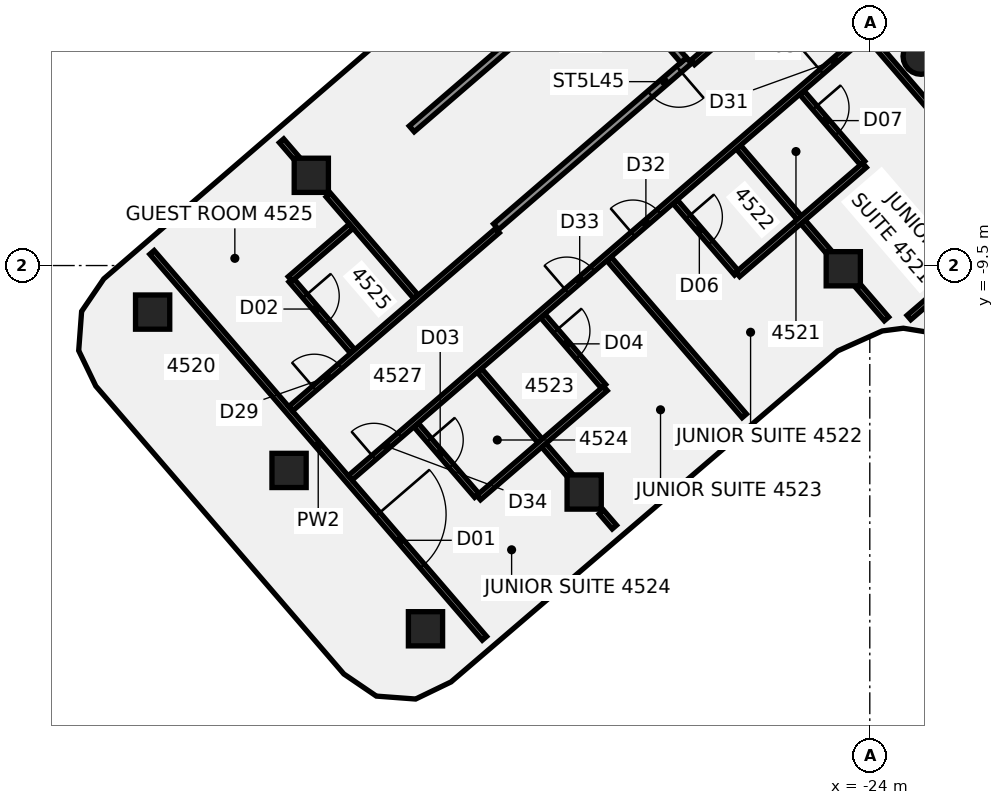
"""IFC4 building model, lengths in metres.
Left out: names, types, materials, properties, quantities, classifications, styles, units other than length and angle.
Written with IfcOpenShell. Run it as: python <this file> out.ifc"""

import sys

from ifc_helpers import new_model, si_unit, direction, frame, frame_2d, origin, origin_2d, place, context, subcontext, project, spatial, polyline, rectangle, circle, outline, extrude, element, fill, save


model = new_model("IFC4")
c1 = context("Model", 3, precision=1e-05, world=origin(), true_north=direction((0.0, 1.0)))
c2 = subcontext(c1, "Body", "Model", "MODEL_VIEW")
j1 = project(units=[si_unit("LENGTHUNIT", "METRE"), si_unit("PLANEANGLEUNIT", "RADIAN")], contexts=[c1])
p1 = place(None, origin())
s1 = spatial("IfcSite", under=j1, at=p1, CompositionType="ELEMENT")
p2 = place(p1, origin())
s2 = spatial("IfcBuilding", under=s1, at=p2, CompositionType="ELEMENT")
p3 = place(p2, frame((0.0, 0.0, 182.5)))
s3 = spatial("IfcBuildingStorey", under=s2, at=p3, CompositionType="ELEMENT", Elevation=182.5)
p4 = place(p3, frame((-22.651, -3.994, -0.14), z_axis=(0.0, 0.0, 1.0), x_axis=(1.0, 0.0, 0.0)))
e1 = element("IfcColumn", 1, at=p4, inside=s3, PredefinedType="COLUMN", context=c2, shape_type="SweptSolid", body=[
    extrude(circle(Radius=0.475, at=origin_2d()), origin(), (0.0, 0.0, 1.0), 3.6),
])
p5 = place(p3, frame((-31.516, -15.459, -0.133), z_axis=(0.07839124964, -0.047319070379, 0.995799034725), x_axis=(-0.649009542698, 0.755788776181, 0.087005398028)))
e2 = element("IfcColumn", 2, at=p5, inside=s3, PredefinedType="COLUMN", context=c2, shape_type="SweptSolid", body=[
    extrude(rectangle(XDim=0.9, YDim=0.9, at=origin_2d()), origin(), (0.0, 0.0, 1.0), 3.606),
])
p6 = place(p3, frame((-38.696, -7.126, -0.133), z_axis=(0.036686006843, -0.083863399406, 0.995801720797), x_axis=(0.758162598415, 0.651508924479, 0.026936883435)))
e3 = element("IfcColumn", 3, at=p6, inside=s3, PredefinedType="COLUMN", context=c2, shape_type="SweptSolid", body=[
    extrude(rectangle(XDim=0.9, YDim=0.9, at=origin_2d()), origin(), (0.0, 0.0, 1.0), 3.607),
])
p7 = place(p3, frame((-24.698, -9.584, -0.135), z_axis=(0.048576320124, -0.013229584391, 0.998731855515), x_axis=(-0.651247732409, 0.757717932984, 0.04171240903)))
e4 = element("IfcColumn", 4, at=p7, inside=s3, PredefinedType="COLUMN", context=c2, shape_type="SweptSolid", body=[
    extrude(rectangle(XDim=0.9, YDim=0.9, at=origin_2d()), origin(), (0.0, 0.0, 1.0), 3.599),
])
p8 = place(p3, frame((-42.871, -10.725, -0.125), z_axis=(0.10577694023, -0.05897537844, 0.992639483223), x_axis=(-0.6465033883, 0.75438904644, 0.113712512625)))
e5 = element("IfcColumn", 5, at=p8, inside=s3, PredefinedType="COLUMN", context=c2, shape_type="SweptSolid", body=[
    extrude(rectangle(XDim=0.9, YDim=0.9, at=origin_2d()), origin(), (0.0, 0.0, 1.0), 3.61),
])
p9 = place(p3, frame((-39.281, -14.891, -0.126), z_axis=(0.12637463351, -0.040639705862, 0.99114976987), x_axis=(-0.645550569996, 0.755269902041, 0.113277697048)))
e6 = element("IfcColumn", 6, at=p9, inside=s3, PredefinedType="COLUMN", context=c2, shape_type="SweptSolid", body=[
    extrude(rectangle(XDim=0.9, YDim=0.9, at=origin_2d()), origin(), (0.0, 0.0, 1.0), 3.616),
])
p10 = place(p3, frame((-35.691, -19.058, -0.128), z_axis=(0.146831669094, -0.022351267372, 0.988908935038), x_axis=(-0.644567349154, 0.756181261603, 0.112795531851)))
e7 = element("IfcColumn", 7, at=p10, inside=s3, PredefinedType="COLUMN", context=c2, shape_type="SweptSolid", body=[
    extrude(rectangle(XDim=0.9, YDim=0.9, at=origin_2d()), origin(), (0.0, 0.0, 1.0), 3.626),
])
p11 = place(p3, frame((-42.888, -9.154, 0.0), z_axis=(0.0, 0.0, 1.0), x_axis=(0.652715459728, -0.75760314719, 0.0)))
e8 = element("IfcWall", 8, at=p11, inside=s3, PredefinedType="PARTITIONING", context=c2, shape_type="SweptSolid", body=[
    extrude(rectangle(XDim=13.403, YDim=0.15, at=frame_2d((6.701, 0.0))), origin(), (0.0, 0.0, 1.0), 2.864),
])
p12 = place(p11, frame((9.099, 0.0, 0.0)))
e9 = element("IfcOpeningElement", 9, at=p12, cuts=e8, PredefinedType="OPENING", context=c2, shape_type="SweptSolid", body=[
    extrude(rectangle(XDim=1.8, YDim=2.1, at=frame_2d((0.9, 1.05))), frame((0.0, 0.085, 0.0), z_axis=(0.0, -1.0, 0.0), x_axis=(1.0, 0.0, 0.0)), (0.0, 0.0, 1.0), 0.17),
])
p13 = place(p3, frame((-39.479, -6.217, 0.0), z_axis=(0.0, 0.0, 1.0), x_axis=(0.652651234918, -0.757658475541, 0.0)))
e10 = element("IfcWall", 10, at=p13, inside=s3, PredefinedType="PARTITIONING", context=c2, shape_type="SweptSolid", body=[
    extrude(rectangle(XDim=0.821, YDim=0.15, at=frame_2d((0.41, 0.0))), origin(), (0.0, 0.0, 1.0), 2.864),
])
p14 = place(p3, frame((-38.248, -7.646, 0.0), z_axis=(0.0, 0.0, 1.0), x_axis=(0.652741368874, -0.757580824309, 0.0)))
e11 = element("IfcWall", 11, at=p14, inside=s3, PredefinedType="PARTITIONING", context=c2, shape_type="SweptSolid", body=[
    extrude(rectangle(XDim=3.533, YDim=0.15, at=frame_2d((1.766, 0.0))), origin(), (0.0, 0.0, 1.0), 2.864),
])
p15 = place(p3, frame((-34.271, -12.262, 0.0), z_axis=(0.0, 0.0, 1.0), x_axis=(0.652795291218, -0.757534360781, 0.0)))
e12 = element("IfcWall", 12, at=p15, inside=s3, PredefinedType="PARTITIONING", context=c2, shape_type="SweptSolid", body=[
    extrude(rectangle(XDim=3.848, YDim=0.15, at=frame_2d((1.924, 0.0))), origin(), (0.0, 0.0, 1.0), 2.864),
])
p16 = place(p3, frame((-31.063, -15.984, 0.0), z_axis=(0.0, 0.0, 1.0), x_axis=(0.652709025629, -0.757608690462, 0.0)))
e13 = element("IfcWall", 13, at=p16, inside=s3, PredefinedType="PARTITIONING", context=c2, shape_type="SweptSolid", body=[
    extrude(rectangle(XDim=0.524, YDim=0.15, at=frame_2d((0.262, 0.0))), origin(), (0.0, 0.0, 1.0), 2.864),
])
p17 = place(p3, frame((-39.227, -9.879, 0.0), z_axis=(0.0, 0.0, 1.0), x_axis=(0.652686423647, -0.757628162351, 0.0)))
e14 = element("IfcWall", 14, at=p17, inside=s3, PredefinedType="PARTITIONING", context=c2, shape_type="SweptSolid", body=[
    extrude(rectangle(XDim=2.48, YDim=0.15, at=frame_2d((1.24, 0.0))), origin(), (0.0, 0.0, 1.0), 2.864),
])
p18 = place(p17, frame((0.56, 0.0, 0.0)))
e15 = element("IfcOpeningElement", 15, at=p18, cuts=e14, PredefinedType="OPENING", context=c2, shape_type="SweptSolid", body=[
    extrude(rectangle(XDim=0.9, YDim=2.1, at=frame_2d((0.45, 1.05))), frame((0.0, 0.085, 0.0), z_axis=(0.0, -1.0, 0.0), x_axis=(1.0, 0.0, 0.0)), (0.0, 0.0, 1.0), 0.17),
])
p19 = place(p3, frame((-35.938, -13.698, 0.0), z_axis=(0.0, 0.0, 1.0), x_axis=(0.652688747073, -0.757626160745, 0.0)))
e16 = element("IfcWall", 16, at=p19, inside=s3, PredefinedType="PARTITIONING", context=c2, shape_type="SweptSolid", body=[
    extrude(rectangle(XDim=2.445, YDim=0.15, at=frame_2d((1.223, 0.0))), origin(), (0.0, 0.0, 1.0), 2.864),
])
p20 = place(p19, frame((0.52, 0.0, 0.0)))
e17 = element("IfcOpeningElement", 17, at=p20, cuts=e16, PredefinedType="OPENING", context=c2, shape_type="SweptSolid", body=[
    extrude(rectangle(XDim=0.9, YDim=2.1, at=frame_2d((0.45, 1.05))), frame((0.0, 0.085, 0.0), z_axis=(0.0, -1.0, 0.0), x_axis=(1.0, 0.0, 0.0)), (0.0, 0.0, 1.0), 0.17),
])
p21 = place(p3, frame((-32.604, -10.826, 0.0), z_axis=(0.0, 0.0, 1.0), x_axis=(0.652688747073, -0.757626160745, 0.0)))
e18 = element("IfcWall", 18, at=p21, inside=s3, PredefinedType="PARTITIONING", context=c2, shape_type="SweptSolid", body=[
    extrude(rectangle(XDim=2.445, YDim=0.15, at=frame_2d((1.223, 0.0))), origin(), (0.0, 0.0, 1.0), 2.864),
])
p22 = place(p21, frame((0.52, 0.0, 0.0)))
e19 = element("IfcOpeningElement", 19, at=p22, cuts=e18, PredefinedType="OPENING", context=c2, shape_type="SweptSolid", body=[
    extrude(rectangle(XDim=0.9, YDim=2.1, at=frame_2d((0.45, 1.05))), frame((0.0, 0.085, 0.0), z_axis=(0.0, -1.0, 0.0), x_axis=(1.0, 0.0, 0.0)), (0.0, 0.0, 1.0), 0.17),
])
p23 = place(p3, frame((-30.862, -9.325, 0.0), z_axis=(0.0, 0.0, 1.0), x_axis=(0.652740266832, -0.757581773841, 0.0)))
e20 = element("IfcWall", 20, at=p23, inside=s3, PredefinedType="PARTITIONING", context=c2, shape_type="SweptSolid", body=[
    extrude(rectangle(XDim=5.451, YDim=0.15, at=frame_2d((2.726, 0.0))), origin(), (0.0, 0.0, 1.0), 2.864),
])
p24 = place(p3, frame((-29.251, 2.595, 0.0), z_axis=(0.0, 0.0, 1.0), x_axis=(0.652713725704, -0.757604641141, 0.0)))
e21 = element("IfcWall", 21, at=p24, inside=s3, PredefinedType="PARTITIONING", context=c2, shape_type="SweptSolid", body=[
    extrude(rectangle(XDim=14.219, YDim=0.15, at=frame_2d((7.109, 0.0))), origin(), (0.0, 0.0, 1.0), 2.864),
])
p25 = place(p24, frame((5.799, 0.0, 0.0)))
e22 = element("IfcOpeningElement", 22, at=p25, cuts=e21, PredefinedType="OPENING", context=c2, shape_type="SweptSolid", body=[
    extrude(rectangle(XDim=1.4, YDim=2.1, at=frame_2d((0.7, 1.05))), frame((0.0, 0.085, 0.0), z_axis=(0.0, -1.0, 0.0), x_axis=(1.0, 0.0, 0.0)), (0.0, 0.0, 1.0), 0.17),
])
p26 = place(p3, frame((-29.119, -7.823, 0.0), z_axis=(0.0, 0.0, 1.0), x_axis=(0.652888980145, -0.757453615481, 0.0)))
e23 = element("IfcWall", 23, at=p26, inside=s3, PredefinedType="PARTITIONING", context=c2, shape_type="SweptSolid", body=[
    extrude(rectangle(XDim=2.479, YDim=0.15, at=frame_2d((1.24, 0.0))), origin(), (0.0, 0.0, 1.0), 2.864),
])
p27 = place(p26, frame((0.52, 0.0, 0.0)))
e24 = element("IfcOpeningElement", 24, at=p27, cuts=e23, PredefinedType="OPENING", context=c2, shape_type="SweptSolid", body=[
    extrude(rectangle(XDim=0.9, YDim=2.1, at=frame_2d((0.45, 1.05))), frame((0.0, 0.085, 0.0), z_axis=(0.0, -1.0, 0.0), x_axis=(1.0, 0.0, 0.0)), (0.0, 0.0, 1.0), 0.17),
])
p28 = place(p3, frame((-27.453, -6.388, 0.0), z_axis=(0.0, 0.0, 1.0), x_axis=(0.652892175674, -0.757450861075, 0.0)))
e25 = element("IfcWall", 25, at=p28, inside=s3, PredefinedType="PARTITIONING", context=c2, shape_type="SweptSolid", body=[
    extrude(rectangle(XDim=3.766, YDim=0.15, at=frame_2d((1.883, 0.0))), origin(), (0.0, 0.0, 1.0), 2.864),
])
p29 = place(p3, frame((-24.299, -10.048, 0.0), z_axis=(0.0, 0.0, 1.0), x_axis=(0.652995188074, -0.75736205632, 0.0)))
e26 = element("IfcWall", 26, at=p29, inside=s3, PredefinedType="PARTITIONING", context=c2, shape_type="SweptSolid", body=[
    extrude(rectangle(XDim=1.13, YDim=0.15, at=frame_2d((0.565, 0.0))), origin(), (0.0, 0.0, 1.0), 2.864),
])
p30 = place(p3, frame((-25.786, -4.952, 0.0), z_axis=(0.0, 0.0, 1.0), x_axis=(0.652886276294, -0.757455946063, 0.0)))
e27 = element("IfcWall", 27, at=p30, inside=s3, PredefinedType="PARTITIONING", context=c2, shape_type="SweptSolid", body=[
    extrude(rectangle(XDim=2.444, YDim=0.15, at=frame_2d((1.222, 0.0))), origin(), (0.0, 0.0, 1.0), 2.864),
])
p31 = place(p30, frame((0.52, 0.0, 0.0)))
e28 = element("IfcOpeningElement", 28, at=p31, cuts=e27, PredefinedType="OPENING", context=c2, shape_type="SweptSolid", body=[
    extrude(rectangle(XDim=0.9, YDim=2.1, at=frame_2d((0.45, 1.05))), frame((0.0, 0.085, 0.0), z_axis=(0.0, -1.0, 0.0), x_axis=(1.0, 0.0, 0.0)), (0.0, 0.0, 1.0), 0.17),
])
p32 = place(p3, frame((-39.238, -13.268, 0.0), z_axis=(0.0, 0.0, 1.0), x_axis=(0.757588514566, 0.652732443346, 0.0)))
e29 = element("IfcWall", 29, at=p32, inside=s3, PredefinedType="PARTITIONING", context=c2, shape_type="SweptSolid", body=[
    extrude(rectangle(XDim=7.181, YDim=0.15, at=frame_2d((3.59, 0.0))), origin(), (0.0, 0.0, 1.0), 2.864),
])
p33 = place(p32, frame((0.82, 0.0, 0.0)))
e30 = element("IfcOpeningElement", 30, at=p33, cuts=e29, PredefinedType="OPENING", context=c2, shape_type="SweptSolid", body=[
    extrude(rectangle(XDim=0.9, YDim=2.1, at=frame_2d((0.45, 1.05))), frame((0.0, 0.085, 0.0), z_axis=(0.0, -1.0, 0.0), x_axis=(1.0, 0.0, 0.0)), (0.0, 0.0, 1.0), 0.17),
])
p34 = place(p3, frame((-28.663, -4.156, 0.0), z_axis=(0.0, 0.0, 1.0), x_axis=(0.757628792985, 0.652685691615, 0.0)))
e31 = element("IfcWall", 31, at=p34, inside=s3, PredefinedType="PARTITIONING", context=c2, shape_type="SweptSolid", body=[
    extrude(rectangle(XDim=3.88, YDim=0.15, at=frame_2d((1.94, 0.0))), origin(), (0.0, 0.0, 1.0), 2.864),
])
p35 = place(p34, frame((1.95, 0.0, 0.0)))
e32 = element("IfcOpeningElement", 32, at=p35, cuts=e31, PredefinedType="OPENING", context=c2, shape_type="SweptSolid", body=[
    extrude(rectangle(XDim=0.9, YDim=2.1, at=frame_2d((0.45, 1.05))), frame((0.0, 0.085, 0.0), z_axis=(0.0, -1.0, 0.0), x_axis=(1.0, 0.0, 0.0)), (0.0, 0.0, 1.0), 0.17),
])
p36 = place(p3, frame((-39.253, -9.849, 0.0), z_axis=(0.0, 0.0, 1.0), x_axis=(0.757358886991, 0.652998863932, 0.0)))
e33 = element("IfcWall", 33, at=p36, inside=s3, PredefinedType="PARTITIONING", context=c2, shape_type="SweptSolid", body=[
    extrude(rectangle(XDim=2.119, YDim=0.15, at=frame_2d((1.06, 0.0))), origin(), (0.0, 0.0, 1.0), 2.864),
])
p37 = place(p3, frame((-37.671, -15.086, 0.0), z_axis=(0.0, 0.0, 1.0), x_axis=(0.757564439781, 0.652760384505, 0.0)))
e34 = element("IfcWall", 34, at=p37, inside=s3, PredefinedType="PARTITIONING", context=c2, shape_type="SweptSolid", body=[
    extrude(rectangle(XDim=17.839, YDim=0.15, at=frame_2d((8.92, 0.0))), origin(), (0.0, 0.0, 1.0), 2.864),
])
p38 = place(p37, frame((16.369, 0.0, 0.0)))
e35 = element("IfcOpeningElement", 35, at=p38, cuts=e34, PredefinedType="OPENING", context=c2, shape_type="SweptSolid", body=[
    extrude(rectangle(XDim=0.9, YDim=2.1, at=frame_2d((0.45, 1.05))), frame((0.0, 0.085, 0.0), z_axis=(0.0, -1.0, 0.0), x_axis=(1.0, 0.0, 0.0)), (0.0, 0.0, 1.0), 0.17),
])
p39 = place(p37, frame((9.819, 0.0, 0.0)))
e36 = element("IfcOpeningElement", 36, at=p39, cuts=e34, PredefinedType="OPENING", context=c2, shape_type="SweptSolid", body=[
    extrude(rectangle(XDim=0.9, YDim=2.1, at=frame_2d((0.45, 1.05))), frame((0.0, 0.085, 0.0), z_axis=(0.0, -1.0, 0.0), x_axis=(1.0, 0.0, 0.0)), (0.0, 0.0, 1.0), 0.17),
])
p40 = place(p37, frame((7.52, 0.0, 0.0)))
e37 = element("IfcOpeningElement", 37, at=p40, cuts=e34, PredefinedType="OPENING", context=c2, shape_type="SweptSolid", body=[
    extrude(rectangle(XDim=0.9, YDim=2.1, at=frame_2d((0.45, 1.05))), frame((0.0, 0.085, 0.0), z_axis=(0.0, -1.0, 0.0), x_axis=(1.0, 0.0, 0.0)), (0.0, 0.0, 1.0), 0.17),
])
p41 = place(p37, frame((0.82, 0.0, 0.0)))
e38 = element("IfcOpeningElement", 38, at=p41, cuts=e34, PredefinedType="OPENING", context=c2, shape_type="SweptSolid", body=[
    extrude(rectangle(XDim=0.9, YDim=2.1, at=frame_2d((0.45, 1.05))), frame((0.0, 0.085, 0.0), z_axis=(0.0, -1.0, 0.0), x_axis=(1.0, 0.0, 0.0)), (0.0, 0.0, 1.0), 0.17),
])
p42 = place(p3, frame((-34.293, -15.607, 0.0), z_axis=(0.0, 0.0, 1.0), x_axis=(0.757668202235, 0.652639943094, 0.0)))
e39 = element("IfcWall", 39, at=p42, inside=s3, PredefinedType="PARTITIONING", context=c2, shape_type="SweptSolid", body=[
    extrude(rectangle(XDim=4.4, YDim=0.15, at=frame_2d((2.2, 0.0))), origin(), (0.0, 0.0, 1.0), 2.864),
])
p43 = place(p3, frame((-27.473, -9.732, 0.0), z_axis=(0.0, 0.0, 1.0), x_axis=(0.757652172853, 0.652658551595, 0.0)))
e40 = element("IfcWall", 40, at=p43, inside=s3, PredefinedType="PARTITIONING", context=c2, shape_type="SweptSolid", body=[
    extrude(rectangle(XDim=4.399, YDim=0.15, at=frame_2d((2.2, 0.0))), origin(), (0.0, 0.0, 1.0), 2.864),
])
p44 = place(p3, frame((-22.97, -10.868, 0.0), z_axis=(0.0, 0.0, 1.0), x_axis=(0.75753804944, 0.6527910107, 0.0)))
e41 = element("IfcWall", 41, at=p44, inside=s3, PredefinedType="PARTITIONING", context=c2, shape_type="SweptSolid", body=[
    extrude(rectangle(XDim=5.233, YDim=0.15, at=frame_2d((2.616, 0.0))), origin(), (0.0, 0.0, 1.0), 2.864),
])
p45 = place(p3, frame((-28.758, -4.106, -0.14), z_axis=(0.0, 0.0, 1.0), x_axis=(-0.757613125952, -0.652703877257, 0.0)))
e42 = element("IfcWall", 42, at=p45, inside=s3, PredefinedType="SHEAR", context=c2, shape_type="SweptSolid", body=[
    extrude(rectangle(XDim=6.7, YDim=0.2, at=frame_2d((3.35, 0.0))), origin(), (0.0, 0.0, 1.0), 3.004),
])
p46 = place(p45, frame((0.35, 0.0, 0.0)))
e43 = element("IfcOpeningElement", 43, at=p46, cuts=e42, PredefinedType="OPENING", context=c2, shape_type="SweptSolid", body=[
    extrude(rectangle(XDim=1.0, YDim=2.1, at=frame_2d((0.5, 1.05))), frame((0.0, 0.11, 0.0), z_axis=(0.0, -1.0, 0.0), x_axis=(1.0, 0.0, 0.0)), (0.0, 0.0, 1.0), 0.22),
])
p47 = place(p3, frame((-30.977, -1.531, -0.14), z_axis=(0.0, 0.0, 1.0), x_axis=(-0.757595106879, -0.652724791955, 0.0)))
e44 = element("IfcWall", 44, at=p47, inside=s3, PredefinedType="SHEAR", context=c2, shape_type="SweptSolid", body=[
    extrude(rectangle(XDim=6.7, YDim=0.2, at=frame_2d((3.35, 0.0))), origin(), (0.0, 0.0, 1.0), 3.004),
])
p48 = place(p3, frame((-30.988, -1.672, -0.14), z_axis=(0.0, 0.0, 1.0), x_axis=(0.652749445371, -0.75757386542, 0.0)))
e45 = element("IfcWall", 45, at=p48, inside=s3, PredefinedType="SHEAR", context=c2, shape_type="SweptSolid", body=[
    extrude(rectangle(XDim=3.2, YDim=0.2, at=frame_2d((1.6, 0.0))), origin(), (0.0, 0.0, 1.0), 3.004),
])
p49 = place(p3, frame((0.0, 0.0, -0.14)))
e46 = element("IfcWall", 46, at=p49, inside=s3, PredefinedType="SHEAR", context=c2, shape_type="SweptSolid", body=[
    extrude(outline(polyline([(-35.836, -5.849), (-35.988, -5.979), (-33.899, -8.404), (-33.747, -8.273), (-35.836, -5.849)])), origin(), (0.0, 0.0, 1.0), 3.004),
])
p50 = place(p12, frame((1.8, 0.0, 0.0), z_axis=(0.0, 0.0, 1.0), x_axis=(-1.0, 0.0, 0.0)))
e47 = element("IfcDoor", 47, at=p50, inside=s3, OperationType="DOUBLE_DOOR_SINGLE_SWING", PredefinedType="DOOR", context=c2, shape_type="SweptSolid", body=[
    extrude(rectangle(XDim=1.8, YDim=2.1, at=frame_2d((0.9, 1.05))), frame((0.0, 0.025, 0.0), z_axis=(0.0, -1.0, 0.0), x_axis=(1.0, 0.0, 0.0)), (0.0, 0.0, 1.0), 0.05),
])
fill(e9, e47)
p51 = place(p18, origin())
e48 = element("IfcDoor", 48, at=p51, inside=s3, OperationType="SINGLE_SWING_RIGHT", PredefinedType="DOOR", context=c2, shape_type="SweptSolid", body=[
    extrude(rectangle(XDim=0.9, YDim=2.1, at=frame_2d((0.45, 1.05))), frame((0.0, 0.025, 0.0), z_axis=(0.0, -1.0, 0.0), x_axis=(1.0, 0.0, 0.0)), (0.0, 0.0, 1.0), 0.05),
])
fill(e15, e48)
p52 = place(p20, origin())
e49 = element("IfcDoor", 49, at=p52, inside=s3, OperationType="SINGLE_SWING_RIGHT", PredefinedType="DOOR", context=c2, shape_type="SweptSolid", body=[
    extrude(rectangle(XDim=0.9, YDim=2.1, at=frame_2d((0.45, 1.05))), frame((0.0, 0.025, 0.0), z_axis=(0.0, -1.0, 0.0), x_axis=(1.0, 0.0, 0.0)), (0.0, 0.0, 1.0), 0.05),
])
fill(e17, e49)
p53 = place(p22, frame((0.9, 0.0, 0.0), z_axis=(0.0, 0.0, 1.0), x_axis=(-1.0, 0.0, 0.0)))
e50 = element("IfcDoor", 50, at=p53, inside=s3, OperationType="SINGLE_SWING_LEFT", PredefinedType="DOOR", context=c2, shape_type="SweptSolid", body=[
    extrude(rectangle(XDim=0.9, YDim=2.1, at=frame_2d((0.45, 1.05))), frame((0.0, 0.025, 0.0), z_axis=(0.0, -1.0, 0.0), x_axis=(1.0, 0.0, 0.0)), (0.0, 0.0, 1.0), 0.05),
])
fill(e19, e50)
p54 = place(p27, origin())
e51 = element("IfcDoor", 51, at=p54, inside=s3, OperationType="SINGLE_SWING_RIGHT", PredefinedType="DOOR", context=c2, shape_type="SweptSolid", body=[
    extrude(rectangle(XDim=0.9, YDim=2.1, at=frame_2d((0.45, 1.05))), frame((0.0, 0.025, 0.0), z_axis=(0.0, -1.0, 0.0), x_axis=(1.0, 0.0, 0.0)), (0.0, 0.0, 1.0), 0.05),
])
fill(e24, e51)
p55 = place(p31, frame((0.9, 0.0, 0.0), z_axis=(0.0, 0.0, 1.0), x_axis=(-1.0, 0.0, 0.0)))
e52 = element("IfcDoor", 52, at=p55, inside=s3, OperationType="SINGLE_SWING_LEFT", PredefinedType="DOOR", context=c2, shape_type="SweptSolid", body=[
    extrude(rectangle(XDim=0.9, YDim=2.1, at=frame_2d((0.45, 1.05))), frame((0.0, 0.025, 0.0), z_axis=(0.0, -1.0, 0.0), x_axis=(1.0, 0.0, 0.0)), (0.0, 0.0, 1.0), 0.05),
])
fill(e28, e52)
p56 = place(p33, origin())
e53 = element("IfcDoor", 53, at=p56, inside=s3, OperationType="SINGLE_SWING_RIGHT", PredefinedType="DOOR", context=c2, shape_type="SweptSolid", body=[
    extrude(rectangle(XDim=0.9, YDim=2.1, at=frame_2d((0.45, 1.05))), frame((0.0, 0.025, 0.0), z_axis=(0.0, -1.0, 0.0), x_axis=(1.0, 0.0, 0.0)), (0.0, 0.0, 1.0), 0.05),
])
fill(e30, e53)
p57 = place(p38, frame((0.9, 0.0, 0.0), z_axis=(0.0, 0.0, 1.0), x_axis=(-1.0, 0.0, 0.0)))
e54 = element("IfcDoor", 54, at=p57, inside=s3, OperationType="SINGLE_SWING_RIGHT", PredefinedType="DOOR", context=c2, shape_type="SweptSolid", body=[
    extrude(rectangle(XDim=0.9, YDim=2.1, at=frame_2d((0.45, 1.05))), frame((0.0, 0.025, 0.0), z_axis=(0.0, -1.0, 0.0), x_axis=(1.0, 0.0, 0.0)), (0.0, 0.0, 1.0), 0.05),
])
fill(e35, e54)
p58 = place(p39, frame((0.9, 0.0, 0.0), z_axis=(0.0, 0.0, 1.0), x_axis=(-1.0, 0.0, 0.0)))
e55 = element("IfcDoor", 55, at=p58, inside=s3, OperationType="SINGLE_SWING_RIGHT", PredefinedType="DOOR", context=c2, shape_type="SweptSolid", body=[
    extrude(rectangle(XDim=0.9, YDim=2.1, at=frame_2d((0.45, 1.05))), frame((0.0, 0.025, 0.0), z_axis=(0.0, -1.0, 0.0), x_axis=(1.0, 0.0, 0.0)), (0.0, 0.0, 1.0), 0.05),
])
fill(e36, e55)
p59 = place(p40, frame((0.9, 0.0, 0.0), z_axis=(0.0, 0.0, 1.0), x_axis=(-1.0, 0.0, 0.0)))
e56 = element("IfcDoor", 56, at=p59, inside=s3, OperationType="SINGLE_SWING_LEFT", PredefinedType="DOOR", context=c2, shape_type="SweptSolid", body=[
    extrude(rectangle(XDim=0.9, YDim=2.1, at=frame_2d((0.45, 1.05))), frame((0.0, 0.025, 0.0), z_axis=(0.0, -1.0, 0.0), x_axis=(1.0, 0.0, 0.0)), (0.0, 0.0, 1.0), 0.05),
])
fill(e37, e56)
p60 = place(p41, frame((0.9, 0.0, 0.0), z_axis=(0.0, 0.0, 1.0), x_axis=(-1.0, 0.0, 0.0)))
e57 = element("IfcDoor", 57, at=p60, inside=s3, OperationType="SINGLE_SWING_LEFT", PredefinedType="DOOR", context=c2, shape_type="SweptSolid", body=[
    extrude(rectangle(XDim=0.9, YDim=2.1, at=frame_2d((0.45, 1.05))), frame((0.0, 0.025, 0.0), z_axis=(0.0, -1.0, 0.0), x_axis=(1.0, 0.0, 0.0)), (0.0, 0.0, 1.0), 0.05),
])
fill(e38, e57)
p61 = place(p46, origin())
e58 = element("IfcDoor", 58, at=p61, inside=s3, OperationType="SINGLE_SWING_LEFT", PredefinedType="DOOR", context=c2, shape_type="SweptSolid", body=[
    extrude(rectangle(XDim=1.0, YDim=2.1, at=frame_2d((0.5, 1.05))), frame((0.0, 0.025, 0.0), z_axis=(0.0, -1.0, 0.0), x_axis=(1.0, 0.0, 0.0)), (0.0, 0.0, 1.0), 0.05),
])
fill(e43, e58)
save(model, sys.argv[1])
